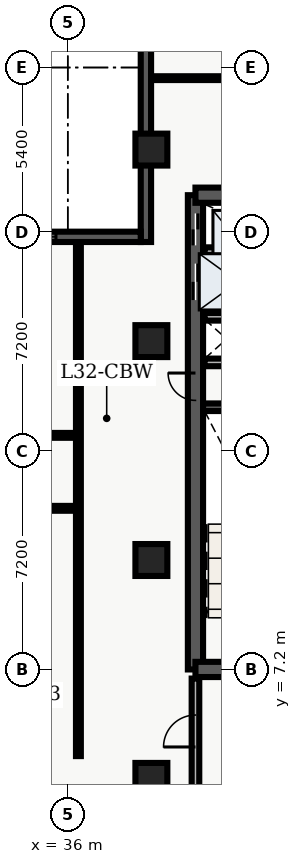
"""IFC4 building model, lengths in metres.
Left out: names, types, materials, properties, quantities, classifications, styles, units other than length and angle.
Written with IfcOpenShell. Run it as: python <this file> out.ifc"""

import sys

from ifc_helpers import new_model, entity, si_unit, converted_unit, direction, frame, origin_with_axes, origin_2d_with_axis, place, context, subcontext, project, spatial, polyline, rectangle, outline, extrude, element, fill, save


model = new_model("IFC4")
c1 = context("Model", 3, precision=1e-05, world=origin_with_axes(), true_north=direction((0.0, 1.0)))
c2 = subcontext(c1, "Body", "Model", "MODEL_VIEW")
j1 = project(units=[si_unit("LENGTHUNIT", "METRE"), converted_unit("PLANEANGLEUNIT", "DEGREE", entity("IfcPlaneAngleMeasure", 0.017), si_unit("PLANEANGLEUNIT", "RADIAN"), dimensions=[0, 0, 0, 0, 0, 0, 0])], contexts=[c1])
p1 = place(None, origin_with_axes())
s1 = spatial("IfcSite", under=j1, at=p1, CompositionType="ELEMENT")
p2 = place(p1, origin_with_axes())
s2 = spatial("IfcBuilding", under=s1, at=p2, CompositionType="ELEMENT")
p3 = place(p2, frame((0.0, 0.0, 132.9), z_axis=(0.0, 0.0, 1.0), x_axis=(1.0, 0.0, 0.0)))
s3 = spatial("IfcBuildingStorey", under=s2, at=p3, CompositionType="ELEMENT", Elevation=132.9)
p4 = place(p3, frame((40.2, 7.2, 0.0), z_axis=(0.0, 0.0, 1.0), x_axis=(0.0, 1.0, 0.0)))
e1 = element("IfcWall", 1, at=p4, inside=s3, PredefinedType="SHEAR", context=c2, shape_type="SweptSolid", body=[
    extrude(outline(polyline([(0.0, -0.25), (15.6, -0.25), (15.6, 0.25), (0.0, 0.25), (0.0, -0.25)])), origin_with_axes(), (0.0, 0.0, 1.0), 3.66),
])
p5 = place(p4, frame((14.475, 0.0, 0.0), z_axis=(0.0, 0.0, 1.0), x_axis=(1.0, 0.0, 0.0)))
e2 = element("IfcOpeningElement", 2, at=p5, cuts=e1, PredefinedType="OPENING", context=c2, shape_type="SweptSolid", body=[
    extrude(rectangle(XDim=1.05, YDim=0.52, at=origin_2d_with_axis()), origin_with_axes(), (0.0, 0.0, 1.0), 2.15),
])
p6 = place(p4, frame((12.75, 0.0, 0.0), z_axis=(0.0, 0.0, 1.0), x_axis=(1.0, 0.0, 0.0)))
e3 = element("IfcOpeningElement", 3, at=p6, cuts=e1, PredefinedType="OPENING", context=c2, shape_type="SweptSolid", body=[
    extrude(rectangle(XDim=1.2, YDim=0.52, at=origin_2d_with_axis()), origin_with_axes(), (0.0, 0.0, 1.0), 2.15),
])
p7 = place(p4, frame((9.3, 0.0, 0.0), z_axis=(0.0, 0.0, 1.0), x_axis=(1.0, 0.0, 0.0)))
e4 = element("IfcOpeningElement", 4, at=p7, cuts=e1, PredefinedType="OPENING", context=c2, shape_type="SweptSolid", body=[
    extrude(rectangle(XDim=0.9, YDim=0.52, at=origin_2d_with_axis()), origin_with_axes(), (0.0, 0.0, 1.0), 2.15),
])
p8 = place(p3, frame((40.2, 7.2, 0.0), z_axis=(0.0, 0.0, 1.0), x_axis=(1.0, 0.0, 0.0)))
e5 = element("IfcWall", 5, at=p8, inside=s3, PredefinedType="SHEAR", context=c2, shape_type="SweptSolid", body=[
    extrude(outline(polyline([(0.0, -0.25), (7.85, -0.25), (7.85, 0.25), (0.0, 0.25), (0.0, -0.25)])), origin_with_axes(), (0.0, 0.0, 1.0), 3.66),
])
p9 = place(p8, frame((2.175, 0.0, 0.0), z_axis=(0.0, 0.0, 1.0), x_axis=(1.0, 0.0, 0.0)))
e6 = element("IfcOpeningElement", 6, at=p9, cuts=e5, PredefinedType="OPENING", context=c2, shape_type="SweptSolid", body=[
    extrude(rectangle(XDim=1.05, YDim=0.52, at=origin_2d_with_axis()), origin_with_axes(), (0.0, 0.0, 1.0), 2.15),
])
p10 = place(p3, frame((40.2, 22.8, 0.0), z_axis=(0.0, 0.0, 1.0), x_axis=(1.0, 0.0, 0.0)))
e7 = element("IfcWall", 7, at=p10, inside=s3, PredefinedType="SHEAR", context=c2, shape_type="SweptSolid", body=[
    extrude(outline(polyline([(0.0, -0.25), (7.85, -0.25), (7.85, 0.25), (0.0, 0.25), (0.0, -0.25)])), origin_with_axes(), (0.0, 0.0, 1.0), 3.66),
])
p11 = place(p10, frame((5.775, 0.0, 0.0), z_axis=(0.0, 0.0, 1.0), x_axis=(1.0, 0.0, 0.0)))
e8 = element("IfcOpeningElement", 8, at=p11, cuts=e7, PredefinedType="OPENING", context=c2, shape_type="SweptSolid", body=[
    extrude(rectangle(XDim=1.05, YDim=0.52, at=origin_2d_with_axis()), origin_with_axes(), (0.0, 0.0, 1.0), 2.15),
])
p12 = place(p3, frame((40.45, 15.825, 0.0), z_axis=(0.0, 0.0, 1.0), x_axis=(1.0, 0.0, 0.0)))
e9 = element("IfcWall", 9, at=p12, inside=s3, PredefinedType="SHEAR", context=c2, shape_type="SweptSolid", body=[
    extrude(outline(polyline([(0.0, -0.125), (3.55, -0.125), (3.55, 0.125), (0.0, 0.125), (0.0, -0.125)])), origin_with_axes(), (0.0, 0.0, 1.0), 3.66),
])
p13 = place(p3, frame((40.5, 17.3, 0.0), z_axis=(0.0, 0.0, 1.0), x_axis=(1.0, 0.0, 0.0)))
e10 = element("IfcWall", 10, at=p13, inside=s3, PredefinedType="SOLIDWALL", context=c2, shape_type="SweptSolid", body=[
    extrude(outline(polyline([(0.0, -0.125), (3.5, -0.125), (3.5, 0.125), (0.0, 0.125), (0.0, -0.125)])), origin_with_axes(), (0.0, 0.0, 1.0), 2.7),
])
p14 = place(p13, frame((2.4, 0.0, 0.0), z_axis=(0.0, 0.0, 1.0), x_axis=(1.0, 0.0, 0.0)))
e11 = element("IfcOpeningElement", 11, at=p14, cuts=e10, PredefinedType="OPENING", context=c2, shape_type="SweptSolid", body=[
    extrude(rectangle(XDim=0.9, YDim=0.27, at=origin_2d_with_axis()), origin_with_axes(), (0.0, 0.0, 1.0), 2.15),
])
p15 = place(p3, frame((40.5, 18.8, 0.0), z_axis=(0.0, 0.0, 1.0), x_axis=(1.0, 0.0, 0.0)))
e12 = element("IfcWall", 12, at=p15, inside=s3, PredefinedType="SOLIDWALL", context=c2, shape_type="SweptSolid", body=[
    extrude(outline(polyline([(0.0, -0.125), (3.5, -0.125), (3.5, 0.125), (0.0, 0.125), (0.0, -0.125)])), origin_with_axes(), (0.0, 0.0, 1.0), 2.7),
])
p16 = place(p3, frame((40.2, 3.1, 0.0), z_axis=(0.0, 0.0, 1.0), x_axis=(0.0, 1.0, 0.0)))
e13 = element("IfcWall", 13, at=p16, inside=s3, PredefinedType="SOLIDWALL", context=c2, shape_type="SweptSolid", body=[
    extrude(outline(polyline([(0.0, -0.125), (3.8, -0.125), (3.8, 0.125), (0.0, 0.125), (0.0, -0.125)])), origin_with_axes(), (0.0, 0.0, 1.0), 2.7),
])
p17 = place(p16, frame((2.075, 0.0, 0.0), z_axis=(0.0, 0.0, 1.0), x_axis=(1.0, 0.0, 0.0)))
e14 = element("IfcOpeningElement", 14, at=p17, cuts=e13, PredefinedType="OPENING", context=c2, shape_type="SweptSolid", body=[
    extrude(rectangle(XDim=1.05, YDim=0.27, at=origin_2d_with_axis()), origin_with_axes(), (0.0, 0.0, 1.0), 2.15),
])
for number, where, z_axis, x_axis in (
    (15, (38.75, 3.6, 0.0), (0.0, 0.0, 1.0), (1.0, 0.0, 0.0)),
    (16, (38.75, 10.8, 0.0), (0.0, 0.0, 1.0), (1.0, 0.0, 0.0)),
    (17, (38.75, 18.0, 0.0), (0.0, 0.0, 1.0), (1.0, 0.0, 0.0)),
    (18, (38.75, 24.3, 0.0), (0.0, 0.0, 1.0), (1.0, 0.0, 0.0)),
):
    element("IfcColumn", number, at=place(p3, frame(where, z_axis=z_axis, x_axis=x_axis)), inside=s3, PredefinedType="COLUMN", context=c2, shape_type="SweptSolid", body=[
        extrude(rectangle(XDim=1.05, YDim=1.05, at=origin_2d_with_axis()), origin_with_axes(), (0.0, 0.0, 1.0), 3.9),
    ])
p18 = place(p3, frame((40.5, 20.96, 0.0), z_axis=(0.0, 0.0, 1.0), x_axis=(1.0, 0.0, 0.0)))
e19 = element("IfcWall", 19, at=p18, inside=s3, PredefinedType="SOLIDWALL", context=c2, shape_type="SweptSolid", body=[
    extrude(outline(polyline([(0.0, -0.125), (3.5, -0.125), (3.5, 0.125), (0.0, 0.125), (0.0, -0.125)])), origin_with_axes(), (0.0, 0.0, 1.0), 2.7),
])
p19 = place(p3, frame((21.15, 12.5, 0.0), z_axis=(0.0, 0.0, 1.0), x_axis=(1.0, 0.0, 0.0)))
e20 = element("IfcWall", 20, at=p19, inside=s3, PredefinedType="PARTITIONING", context=c2, shape_type="SweptSolid", body=[
    extrude(outline(polyline([(0.0, -0.08), (15.2, -0.08), (15.2, 0.08), (0.0, 0.08), (0.0, -0.08)])), origin_with_axes(), (0.0, 0.0, 1.0), 2.7),
])
p20 = place(p19, frame((3.623, 0.0, 0.0), z_axis=(0.0, 0.0, 1.0), x_axis=(1.0, 0.0, 0.0)))
e21 = element("IfcOpeningElement", 21, at=p20, cuts=e20, PredefinedType="OPENING", context=c2, shape_type="SweptSolid", body=[
    extrude(rectangle(XDim=1.2, YDim=0.18, at=origin_2d_with_axis()), origin_with_axes(), (0.0, 0.0, 1.0), 2.2),
])
p21 = place(p19, frame((8.921, 0.0, 0.0), z_axis=(0.0, 0.0, 1.0), x_axis=(1.0, 0.0, 0.0)))
e22 = element("IfcOpeningElement", 22, at=p21, cuts=e20, PredefinedType="OPENING", context=c2, shape_type="SweptSolid", body=[
    extrude(rectangle(XDim=1.0, YDim=0.18, at=origin_2d_with_axis()), origin_with_axes(), (0.0, 0.0, 1.0), 2.15),
])
p22 = place(p19, frame((12.947, 0.0, 0.0), z_axis=(0.0, 0.0, 1.0), x_axis=(1.0, 0.0, 0.0)))
e23 = element("IfcOpeningElement", 23, at=p22, cuts=e20, PredefinedType="OPENING", context=c2, shape_type="SweptSolid", body=[
    extrude(rectangle(XDim=1.0, YDim=0.18, at=origin_2d_with_axis()), origin_with_axes(), (0.0, 0.0, 1.0), 2.15),
])
p23 = place(p3, frame((21.15, 14.9, 0.0), z_axis=(0.0, 0.0, 1.0), x_axis=(1.0, 0.0, 0.0)))
e24 = element("IfcWall", 24, at=p23, inside=s3, PredefinedType="PARTITIONING", context=c2, shape_type="SweptSolid", body=[
    extrude(outline(polyline([(0.0, -0.08), (15.2, -0.08), (15.2, 0.08), (0.0, 0.08), (0.0, -0.08)])), origin_with_axes(), (0.0, 0.0, 1.0), 2.7),
])
p24 = place(p23, frame((1.774, 0.0, 0.0), z_axis=(0.0, 0.0, 1.0), x_axis=(1.0, 0.0, 0.0)))
e25 = element("IfcOpeningElement", 25, at=p24, cuts=e24, PredefinedType="OPENING", context=c2, shape_type="SweptSolid", body=[
    extrude(rectangle(XDim=1.0, YDim=0.18, at=origin_2d_with_axis()), origin_with_axes(), (0.0, 0.0, 1.0), 2.15),
])
p25 = place(p23, frame((4.909, 0.0, 0.0), z_axis=(0.0, 0.0, 1.0), x_axis=(1.0, 0.0, 0.0)))
e26 = element("IfcOpeningElement", 26, at=p25, cuts=e24, PredefinedType="OPENING", context=c2, shape_type="SweptSolid", body=[
    extrude(rectangle(XDim=1.0, YDim=0.18, at=origin_2d_with_axis()), origin_with_axes(), (0.0, 0.0, 1.0), 2.15),
])
p26 = place(p23, frame((8.575, 0.0, 0.0), z_axis=(0.0, 0.0, 1.0), x_axis=(1.0, 0.0, 0.0)))
e27 = element("IfcOpeningElement", 27, at=p26, cuts=e24, PredefinedType="OPENING", context=c2, shape_type="SweptSolid", body=[
    extrude(rectangle(XDim=1.0, YDim=0.18, at=origin_2d_with_axis()), origin_with_axes(), (0.0, 0.0, 1.0), 2.15),
])
p27 = place(p23, frame((12.911, 0.0, 0.0), z_axis=(0.0, 0.0, 1.0), x_axis=(1.0, 0.0, 0.0)))
e28 = element("IfcOpeningElement", 28, at=p27, cuts=e24, PredefinedType="OPENING", context=c2, shape_type="SweptSolid", body=[
    extrude(rectangle(XDim=1.0, YDim=0.18, at=origin_2d_with_axis()), origin_with_axes(), (0.0, 0.0, 1.0), 2.15),
])
p28 = place(p3, frame((36.35, 4.35, 0.0), z_axis=(0.0, 0.0, 1.0), x_axis=(0.0, 1.0, 0.0)))
e29 = element("IfcWall", 29, at=p28, inside=s3, PredefinedType="PARTITIONING", context=c2, shape_type="SweptSolid", body=[
    extrude(outline(polyline([(0.0, -0.08), (16.95, -0.08), (16.95, 0.08), (0.0, 0.08), (0.0, -0.08)])), origin_with_axes(), (0.0, 0.0, 1.0), 2.7),
])
p29 = place(p3, frame((38.735, 26.65, 0.0), z_axis=(0.0, 0.0, 1.0), x_axis=(1.0, 0.0, 0.0)))
e30 = element("IfcWall", 30, at=p29, inside=s3, PredefinedType="PARTITIONING", context=c2, shape_type="SweptSolid", body=[
    extrude(outline(polyline([(0.0, -0.062), (20.905, -0.062), (20.905, 0.062), (0.0, 0.062), (0.0, -0.062)])), origin_with_axes(), (0.0, 0.0, 1.0), 2.7),
])
p30 = place(p29, frame((4.265, 0.0, 0.0), z_axis=(0.0, 0.0, 1.0), x_axis=(1.0, 0.0, 0.0)))
e31 = element("IfcOpeningElement", 31, at=p30, cuts=e30, PredefinedType="OPENING", context=c2, shape_type="SweptSolid", body=[
    extrude(rectangle(XDim=1.0, YDim=0.145, at=origin_2d_with_axis()), origin_with_axes(), (0.0, 0.0, 1.0), 2.15),
])
p31 = place(p3, frame((38.57, 21.26, 0.0), z_axis=(0.0, 0.0, 1.0), x_axis=(0.0, 1.0, 0.0)))
e32 = element("IfcWall", 32, at=p31, inside=s3, PredefinedType="SOLIDWALL", context=c2, shape_type="SweptSolid", body=[
    extrude(outline(polyline([(0.0, -0.17), (7.54, -0.17), (7.54, 0.17), (0.0, 0.17), (0.0, -0.17)])), origin_with_axes(), (0.0, 0.0, 1.0), 3.66),
])
p32 = place(p3, frame((21.364, 21.43, 0.0), z_axis=(0.0, 0.0, 1.0), x_axis=(1.0, 0.0, 0.0)))
e33 = element("IfcWall", 33, at=p32, inside=s3, PredefinedType="SOLIDWALL", context=c2, shape_type="SweptSolid", body=[
    extrude(outline(polyline([(0.0, -0.17), (17.036, -0.17), (17.036, 0.17), (0.0, 0.17), (0.0, -0.17)])), origin_with_axes(), (0.0, 0.0, 1.0), 3.66),
])
p33 = place(p32, frame((8.518, 0.0, 0.45), z_axis=(0.0, 0.0, 1.0), x_axis=(1.0, 0.0, 0.0)))
e34 = element("IfcOpeningElement", 34, at=p33, cuts=e33, PredefinedType="OPENING", context=c2, shape_type="SweptSolid", body=[
    extrude(rectangle(XDim=1.8, YDim=0.36, at=origin_2d_with_axis()), origin_with_axes(), (0.0, 0.0, 1.0), 2.1),
])
p34 = place(p32, frame((13.347, 0.0, 0.45), z_axis=(0.0, 0.0, 1.0), x_axis=(1.0, 0.0, 0.0)))
e35 = element("IfcOpeningElement", 35, at=p34, cuts=e33, PredefinedType="OPENING", context=c2, shape_type="SweptSolid", body=[
    extrude(rectangle(XDim=1.8, YDim=0.36, at=origin_2d_with_axis()), origin_with_axes(), (0.0, 0.0, 1.0), 2.1),
])
p35 = place(p4, frame((14.475, 0.0, 0.0), z_axis=(0.0, 0.0, 1.0), x_axis=(1.0, 0.0, 0.0)))
e36 = element("IfcDoor", 36, at=p35, inside=s3, OperationType="SLIDING_TO_RIGHT", PredefinedType="DOOR", context=c2, shape_type="SweptSolid", body=[
    extrude(rectangle(XDim=1.05, YDim=0.09, at=origin_2d_with_axis()), origin_with_axes(), (0.0, 0.0, 1.0), 2.15),
])
fill(e2, e36)
p36 = place(p4, frame((12.75, 0.0, 0.0), z_axis=(0.0, 0.0, 1.0), x_axis=(1.0, 0.0, 0.0)))
e37 = element("IfcDoor", 37, at=p36, inside=s3, OperationType="DOUBLE_DOOR_SLIDING", PredefinedType="DOOR", context=c2, shape_type="SweptSolid", body=[
    extrude(rectangle(XDim=1.2, YDim=0.09, at=origin_2d_with_axis()), origin_with_axes(), (0.0, 0.0, 1.0), 2.15),
])
fill(e3, e37)
p37 = place(p4, frame((9.3, 0.0, 0.0), z_axis=(0.0, 0.0, 1.0), x_axis=(1.0, 0.0, 0.0)))
e38 = element("IfcDoor", 38, at=p37, inside=s3, OperationType="SINGLE_SWING_RIGHT", PredefinedType="DOOR", context=c2, shape_type="SweptSolid", body=[
    extrude(rectangle(XDim=0.9, YDim=0.09, at=origin_2d_with_axis()), origin_with_axes(), (0.0, 0.0, 1.0), 2.15),
])
fill(e4, e38)
p38 = place(p16, frame((2.075, 0.0, 0.0), z_axis=(0.0, 0.0, 1.0), x_axis=(1.0, 0.0, 0.0)))
e39 = element("IfcDoor", 39, at=p38, inside=s3, OperationType="SINGLE_SWING_LEFT", PredefinedType="DOOR", context=c2, shape_type="SweptSolid", body=[
    extrude(rectangle(XDim=1.05, YDim=0.09, at=origin_2d_with_axis()), origin_with_axes(), (0.0, 0.0, 1.0), 2.15),
])
fill(e14, e39)
p39 = place(p32, frame((13.347, 0.0, 0.45), z_axis=(0.0, 0.0, 1.0), x_axis=(1.0, 0.0, 0.0)))
e40 = element("IfcWindow", 40, at=p39, inside=s3, PredefinedType="WINDOW", context=c2, shape_type="SweptSolid", body=[
    extrude(rectangle(XDim=1.8, YDim=0.09, at=origin_2d_with_axis()), origin_with_axes(), (0.0, 0.0, 1.0), 2.1),
])
fill(e35, e40)
save(model, sys.argv[1])
